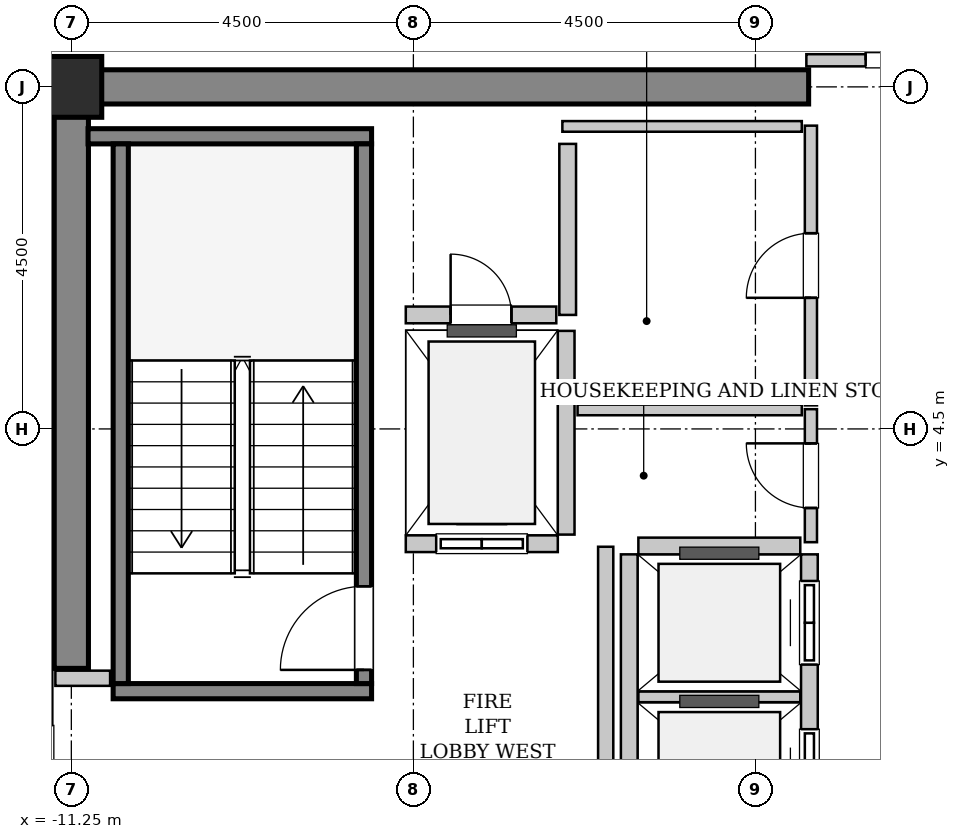
"""IFC4 building model, lengths in metres.
Left out: names, types, materials, properties, quantities, classifications, styles, units other than length and angle.
Written with IfcOpenShell. Run it as: python <this file> out.ifc"""

import sys

from ifc_helpers import new_model, si_unit, direction, frame, frame_2d, origin, origin_2d, place, context, subcontext, project, spatial, rectangle, hollow_rectangle, extrude, source, transform, mapped, element, fill, save


model = new_model("IFC4")
c1 = context("Model", 3, precision=1e-05, world=origin(), true_north=direction((0.0, 1.0)))
c2 = subcontext(c1, "Body", "Model", "MODEL_VIEW")
j1 = project(units=[si_unit("LENGTHUNIT", "METRE"), si_unit("PLANEANGLEUNIT", "RADIAN")], contexts=[c1])
p1 = place(None, origin())
s1 = spatial("IfcSite", under=j1, at=p1, CompositionType="ELEMENT")
p2 = place(p1, origin())
s2 = spatial("IfcBuilding", under=s1, at=p2, CompositionType="ELEMENT")
p3 = place(p2, frame((0.0, 0.0, 283.6)))
s3 = spatial("IfcBuildingStorey", under=s2, at=p3, CompositionType="ELEMENT", Elevation=283.6)
m1 = source(origin(), c2, "Body", "SweptSolid", [
    extrude(rectangle(XDim=9.925, YDim=0.45, at=frame_2d((4.962, 0.0))), origin(), (0.0, 0.0, 1.0), 3.8),
])
p4 = place(p3, frame((-11.475, 9.0, 0.0), z_axis=(0.0, 0.0, 1.0), x_axis=(1.0, 0.0, 0.0)))
e1 = element("IfcWall", 1, at=p4, inside=s3, PredefinedType="SHEAR", context=c2, shape_type="MappedRepresentation", body=[
    mapped(m1, transform((0.0, 0.0, 0.0), x_axis=(1.0, 0.0, 0.0), y_axis=(0.0, 1.0, 0.0), z_axis=(0.0, 0.0, 1.0), scale=1.0)),
])
m2 = source(origin(), c2, "Body", "SweptSolid", [
    extrude(rectangle(XDim=7.425, YDim=0.45, at=frame_2d((3.712, 0.0))), origin(), (0.0, 0.0, 1.0), 3.8),
])
p5 = place(p3, frame((-11.25, 1.35, 0.0), z_axis=(0.0, 0.0, 1.0), x_axis=(0.0, 1.0, 0.0)))
e2 = element("IfcWall", 2, at=p5, inside=s3, PredefinedType="SHEAR", context=c2, shape_type="MappedRepresentation", body=[
    mapped(m2, transform((0.0, 0.0, 0.0), x_axis=(1.0, 0.0, 0.0), y_axis=(0.0, 1.0, 0.0), z_axis=(0.0, 0.0, 1.0), scale=1.0)),
])
m3 = source(origin(), c2, "Body", "SweptSolid", [
    extrude(hollow_rectangle(XDim=0.8, YDim=0.8, WallThickness=0.04, InnerFilletRadius=0.04, OuterFilletRadius=0.08, at=origin_2d()), origin(), (0.0, 0.0, 1.0), 3.8),
])
p6 = place(p3, frame((-11.25, 9.0, 0.0), z_axis=(0.0, 0.0, 1.0), x_axis=(1.0, 0.0, 0.0)))
e3 = element("IfcColumn", 3, at=p6, inside=s3, PredefinedType="COLUMN", context=c2, shape_type="MappedRepresentation", body=[
    mapped(m3, transform((0.0, 0.0, 0.0), x_axis=(1.0, 0.0, 0.0), y_axis=(0.0, 1.0, 0.0), z_axis=(0.0, 0.0, 1.0), scale=1.0)),
])
m4 = source(origin(), c2, "Body", "SweptSolid", [
    extrude(rectangle(XDim=3.4, YDim=0.2, at=frame_2d((1.7, 0.0))), origin(), (0.0, 0.0, 1.0), 3.8),
])
p7 = place(p3, frame((-7.3, 1.05, 0.0), z_axis=(0.0, 0.0, 1.0), x_axis=(-1.0, 0.0, 0.0)))
e4 = element("IfcWall", 4, at=p7, inside=s3, PredefinedType="SOLIDWALL", context=c2, shape_type="MappedRepresentation", body=[
    mapped(m4, transform((0.0, 0.0, 0.0), x_axis=(1.0, 0.0, 0.0), y_axis=(0.0, 1.0, 0.0), z_axis=(0.0, 0.0, 1.0), scale=1.0)),
])
m5 = source(origin(), c2, "Body", "SweptSolid", [
    extrude(rectangle(XDim=3.73, YDim=0.2, at=frame_2d((1.865, 0.0))), origin(), (0.0, 0.0, 1.0), 3.8),
])
p8 = place(p3, frame((-7.3, 8.35, 0.0), z_axis=(0.0, 0.0, 1.0), x_axis=(-1.0, 0.0, 0.0)))
e5 = element("IfcWall", 5, at=p8, inside=s3, PredefinedType="SOLIDWALL", context=c2, shape_type="MappedRepresentation", body=[
    mapped(m5, transform((0.0, 0.0, 0.0), x_axis=(1.0, 0.0, 0.0), y_axis=(0.0, 1.0, 0.0), z_axis=(0.0, 0.0, 1.0), scale=1.0)),
])
m6 = source(origin(), c2, "Body", "SweptSolid", [
    extrude(rectangle(XDim=7.1, YDim=0.2, at=frame_2d((3.55, 0.0))), origin(), (0.0, 0.0, 1.0), 3.8),
])
p9 = place(p3, frame((-7.4, 1.15, 0.0), z_axis=(0.0, 0.0, 1.0), x_axis=(0.0, 1.0, 0.0)))
e6 = element("IfcWall", 6, at=p9, inside=s3, PredefinedType="SOLIDWALL", context=c2, shape_type="MappedRepresentation", body=[
    mapped(m6, transform((0.0, 0.0, 0.0), x_axis=(1.0, 0.0, 0.0), y_axis=(0.0, 1.0, 0.0), z_axis=(0.0, 0.0, 1.0), scale=1.0)),
])
p10 = place(p9, frame((0.18, 0.0, 0.0)))
e7 = element("IfcOpeningElement", 7, at=p10, cuts=e6, PredefinedType="OPENING", context=c2, shape_type="SweptSolid", body=[
    extrude(rectangle(XDim=1.1, YDim=2.15, at=frame_2d((0.55, 1.075))), frame((0.0, 0.11, 0.0), z_axis=(0.0, -1.0, 0.0), x_axis=(1.0, 0.0, 0.0)), (0.0, 0.0, 1.0), 0.22),
])
p11 = place(p3, frame((-10.6, 1.15, 0.0), z_axis=(0.0, 0.0, 1.0), x_axis=(0.0, 1.0, 0.0)))
e8 = element("IfcWall", 8, at=p11, inside=s3, PredefinedType="SOLIDWALL", context=c2, shape_type="MappedRepresentation", body=[
    mapped(m6, transform((0.0, 0.0, 0.0), x_axis=(1.0, 0.0, 0.0), y_axis=(0.0, 1.0, 0.0), z_axis=(0.0, 0.0, 1.0), scale=1.0)),
])
m7 = source(origin(), c2, "Body", "SweptSolid", [
    extrude(rectangle(XDim=2.0, YDim=0.22, at=frame_2d((1.0, 0.0))), origin(), (0.0, 0.0, 1.0), 3.535),
])
p12 = place(p3, frame((-6.85, 2.99, 0.0), z_axis=(0.0, 0.0, 1.0), x_axis=(1.0, 0.0, 0.0)))
e9 = element("IfcWall", 9, at=p12, inside=s3, PredefinedType="SOLIDWALL", context=c2, shape_type="MappedRepresentation", body=[
    mapped(m7, transform((0.0, 0.0, 0.0), x_axis=(1.0, 0.0, 0.0), y_axis=(0.0, 1.0, 0.0), z_axis=(0.0, 0.0, 1.0), scale=1.0)),
])
p13 = place(p12, frame((0.4, 0.0, 0.0)))
e10 = element("IfcOpeningElement", 10, at=p13, cuts=e9, PredefinedType="OPENING", context=c2, shape_type="SweptSolid", body=[
    extrude(rectangle(XDim=1.2, YDim=2.2, at=frame_2d((0.6, 1.1))), frame((0.0, 0.12, 0.0), z_axis=(0.0, -1.0, 0.0), x_axis=(1.0, 0.0, 0.0)), (0.0, 0.0, 1.0), 0.24),
])
m8 = source(origin(), c2, "Body", "SweptSolid", [
    extrude(rectangle(XDim=2.68, YDim=0.22, at=frame_2d((1.34, 0.0))), origin(), (0.0, 0.0, 1.0), 3.535),
])
p14 = place(p3, frame((-4.74, 3.11, 0.0), z_axis=(0.0, 0.0, 1.0), x_axis=(0.0, 1.0, 0.0)))
e11 = element("IfcWall", 11, at=p14, inside=s3, PredefinedType="SOLIDWALL", context=c2, shape_type="MappedRepresentation", body=[
    mapped(m8, transform((0.0, 0.0, 0.0), x_axis=(1.0, 0.0, 0.0), y_axis=(0.0, 1.0, 0.0), z_axis=(0.0, 0.0, 1.0), scale=1.0)),
])
m9 = source(origin(), c2, "Body", "SweptSolid", [
    extrude(rectangle(XDim=5.7, YDim=0.22, at=frame_2d((2.85, 0.0))), origin(), (0.0, 0.0, 1.0), 3.535),
])
p15 = place(p3, frame((-1.54, -2.85, 0.0), z_axis=(0.0, 0.0, 1.0), x_axis=(0.0, 1.0, 0.0)))
e12 = element("IfcWall", 12, at=p15, inside=s3, PredefinedType="SOLIDWALL", context=c2, shape_type="MappedRepresentation", body=[
    mapped(m9, transform((0.0, 0.0, 0.0), x_axis=(1.0, 0.0, 0.0), y_axis=(0.0, 1.0, 0.0), z_axis=(0.0, 0.0, 1.0), scale=1.0)),
])
p16 = place(p15, frame((0.35, 0.0, 0.0)))
e13 = element("IfcOpeningElement", 13, at=p16, cuts=e12, PredefinedType="OPENING", context=c2, shape_type="SweptSolid", body=[
    extrude(rectangle(XDim=1.1, YDim=2.2, at=frame_2d((0.55, 1.1))), frame((0.0, 0.12, 0.0), z_axis=(0.0, -1.0, 0.0), x_axis=(1.0, 0.0, 0.0)), (0.0, 0.0, 1.0), 0.24),
])
p17 = place(p15, frame((2.3, 0.0, 0.0)))
e14 = element("IfcOpeningElement", 14, at=p17, cuts=e12, PredefinedType="OPENING", context=c2, shape_type="SweptSolid", body=[
    extrude(rectangle(XDim=1.1, YDim=2.2, at=frame_2d((0.55, 1.1))), frame((0.0, 0.12, 0.0), z_axis=(0.0, -1.0, 0.0), x_axis=(1.0, 0.0, 0.0)), (0.0, 0.0, 1.0), 0.24),
])
p18 = place(p15, frame((4.25, 0.0, 0.0)))
e15 = element("IfcOpeningElement", 15, at=p18, cuts=e12, PredefinedType="OPENING", context=c2, shape_type="SweptSolid", body=[
    extrude(rectangle(XDim=1.1, YDim=2.2, at=frame_2d((0.55, 1.1))), frame((0.0, 0.12, 0.0), z_axis=(0.0, -1.0, 0.0), x_axis=(1.0, 0.0, 0.0)), (0.0, 0.0, 1.0), 0.24),
])
p19 = place(p3, frame((-3.91, 2.85, 0.0), z_axis=(0.0, 0.0, 1.0), x_axis=(0.0, -1.0, 0.0)))
e16 = element("IfcWall", 16, at=p19, inside=s3, PredefinedType="SOLIDWALL", context=c2, shape_type="MappedRepresentation", body=[
    mapped(m9, transform((0.0, 0.0, 0.0), x_axis=(1.0, 0.0, 0.0), y_axis=(0.0, 1.0, 0.0), z_axis=(0.0, 0.0, 1.0), scale=1.0)),
])
m10 = source(origin(), c2, "Body", "SweptSolid", [
    extrude(rectangle(XDim=2.13, YDim=0.14, at=frame_2d((1.065, 0.0))), origin(), (0.0, 0.0, 1.0), 3.535),
])
p20 = place(p3, frame((-3.79, 0.975, 0.0), z_axis=(0.0, 0.0, 1.0), x_axis=(1.0, 0.0, 0.0)))
e17 = element("IfcWall", 17, at=p20, inside=s3, PredefinedType="PARTITIONING", context=c2, shape_type="MappedRepresentation", body=[
    mapped(m10, transform((0.0, 0.0, 0.0), x_axis=(1.0, 0.0, 0.0), y_axis=(0.0, 1.0, 0.0), z_axis=(0.0, 0.0, 1.0), scale=1.0)),
])
m11 = source(origin(), c2, "Body", "SweptSolid", [
    extrude(rectangle(XDim=2.13, YDim=0.22, at=frame_2d((1.065, 0.0))), origin(), (0.0, 0.0, 1.0), 3.535),
])
p21 = place(p3, frame((-1.66, 2.96, 0.0), z_axis=(0.0, 0.0, 1.0), x_axis=(-1.0, 0.0, 0.0)))
e18 = element("IfcWall", 18, at=p21, inside=s3, PredefinedType="SOLIDWALL", context=c2, shape_type="MappedRepresentation", body=[
    mapped(m11, transform((0.0, 0.0, 0.0), x_axis=(1.0, 0.0, 0.0), y_axis=(0.0, 1.0, 0.0), z_axis=(0.0, 0.0, 1.0), scale=1.0)),
])
m12 = source(origin(), c2, "Body", "SweptSolid", [
    extrude(rectangle(XDim=2.25, YDim=0.22, at=frame_2d((1.125, 0.0))), origin(), (0.0, 0.0, 1.0), 3.535),
])
p22 = place(p3, frame((-4.72, 6.0, 0.0), z_axis=(0.0, 0.0, 1.0), x_axis=(0.0, 1.0, 0.0)))
e19 = element("IfcWall", 19, at=p22, inside=s3, PredefinedType="SOLIDWALL", context=c2, shape_type="MappedRepresentation", body=[
    mapped(m12, transform((0.0, 0.0, 0.0), x_axis=(1.0, 0.0, 0.0), y_axis=(0.0, 1.0, 0.0), z_axis=(0.0, 0.0, 1.0), scale=1.0)),
])
m13 = source(origin(), c2, "Body", "SweptSolid", [
    extrude(rectangle(XDim=1.98, YDim=0.22, at=frame_2d((0.99, 0.0))), origin(), (0.0, 0.0, 1.0), 3.535),
])
p23 = place(p3, frame((-6.85, 6.0, 0.0), z_axis=(0.0, 0.0, 1.0), x_axis=(1.0, 0.0, 0.0)))
e20 = element("IfcWall", 20, at=p23, inside=s3, PredefinedType="SOLIDWALL", context=c2, shape_type="MappedRepresentation", body=[
    mapped(m13, transform((0.0, 0.0, 0.0), x_axis=(1.0, 0.0, 0.0), y_axis=(0.0, 1.0, 0.0), z_axis=(0.0, 0.0, 1.0), scale=1.0)),
])
p24 = place(p23, frame((0.59, 0.0, 0.0)))
e21 = element("IfcOpeningElement", 21, at=p24, cuts=e20, PredefinedType="OPENING", context=c2, shape_type="SweptSolid", body=[
    extrude(rectangle(XDim=0.8, YDim=2.0, at=frame_2d((0.4, 1.0))), frame((0.0, 0.12, 0.0), z_axis=(0.0, -1.0, 0.0), x_axis=(1.0, 0.0, 0.0)), (0.0, 0.0, 1.0), 0.24),
])
m14 = source(origin(), c2, "Body", "SweptSolid", [
    extrude(rectangle(XDim=5.9, YDim=0.2, at=frame_2d((2.95, 0.0))), origin(), (0.0, 0.0, 1.0), 3.535),
])
p25 = place(p3, frame((-4.22, -2.95, 0.0), z_axis=(0.0, 0.0, 1.0), x_axis=(0.0, 1.0, 0.0)))
e22 = element("IfcWall", 22, at=p25, inside=s3, PredefinedType="PARTITIONING", context=c2, shape_type="MappedRepresentation", body=[
    mapped(m14, transform((0.0, 0.0, 0.0), x_axis=(1.0, 0.0, 0.0), y_axis=(0.0, 1.0, 0.0), z_axis=(0.0, 0.0, 1.0), scale=1.0)),
])
m15 = source(origin(), c2, "Body", "SweptSolid", [
    extrude(rectangle(XDim=0.72, YDim=0.2, at=frame_2d((0.36, 0.0))), origin(), (0.0, 0.0, 1.0), 3.535),
])
p26 = place(p3, frame((-11.46, 1.22, 0.0), z_axis=(0.0, 0.0, 1.0), x_axis=(1.0, 0.0, 0.0)))
e23 = element("IfcWall", 23, at=p26, inside=s3, PredefinedType="PARTITIONING", context=c2, shape_type="MappedRepresentation", body=[
    mapped(m15, transform((0.0, 0.0, 0.0), x_axis=(1.0, 0.0, 0.0), y_axis=(0.0, 1.0, 0.0), z_axis=(0.0, 0.0, 1.0), scale=1.0)),
])
m16 = source(origin(), c2, "Body", "SweptSolid", [
    extrude(rectangle(XDim=3.16, YDim=0.16, at=frame_2d((1.58, 0.0))), origin(), (0.0, 0.0, 1.0), 2.625),
])
p27 = place(p3, frame((-1.58, 9.35, 0.0), z_axis=(0.0, 0.0, 1.0), x_axis=(1.0, 0.0, 0.0)))
e24 = element("IfcWall", 24, at=p27, inside=s3, PredefinedType="PARTITIONING", context=c2, shape_type="MappedRepresentation", body=[
    mapped(m16, transform((0.0, 0.0, 0.0), x_axis=(1.0, 0.0, 0.0), y_axis=(0.0, 1.0, 0.0), z_axis=(0.0, 0.0, 1.0), scale=1.0)),
])
p28 = place(p27, frame((0.78, 0.0, 0.0)))
e25 = element("IfcOpeningElement", 25, at=p28, cuts=e24, PredefinedType="OPENING", context=c2, shape_type="SweptSolid", body=[
    extrude(rectangle(XDim=1.6, YDim=2.3, at=frame_2d((0.8, 1.15))), frame((0.0, 0.09, 0.0), z_axis=(0.0, -1.0, 0.0), x_axis=(1.0, 0.0, 0.0)), (0.0, 0.0, 1.0), 0.18),
])
m17 = source(origin(), c2, "Body", "SweptSolid", [
    extrude(rectangle(XDim=1.75, YDim=0.16, at=frame_2d((0.875, 0.0))), origin(), (0.0, 0.0, 1.0), 3.535),
])
p29 = place(p3, frame((-1.52, 3.01, 0.0), z_axis=(0.0, 0.0, 1.0), x_axis=(0.0, 1.0, 0.0)))
e26 = element("IfcWall", 26, at=p29, inside=s3, PredefinedType="PARTITIONING", context=c2, shape_type="MappedRepresentation", body=[
    mapped(m17, transform((0.0, 0.0, 0.0), x_axis=(1.0, 0.0, 0.0), y_axis=(0.0, 1.0, 0.0), z_axis=(0.0, 0.0, 1.0), scale=1.0)),
])
p30 = place(p29, frame((0.45, 0.0, 0.0)))
e27 = element("IfcOpeningElement", 27, at=p30, cuts=e26, PredefinedType="OPENING", context=c2, shape_type="SweptSolid", body=[
    extrude(rectangle(XDim=0.85, YDim=2.1, at=frame_2d((0.425, 1.05))), frame((0.0, 0.09, 0.0), z_axis=(0.0, -1.0, 0.0), x_axis=(1.0, 0.0, 0.0)), (0.0, 0.0, 1.0), 0.18),
])
m18 = source(origin(), c2, "Body", "SweptSolid", [
    extrude(rectangle(XDim=2.95, YDim=0.14, at=frame_2d((1.475, 0.0))), origin(), (0.0, 0.0, 1.0), 3.535),
])
p31 = place(p3, frame((-4.59, 4.75, 0.0), z_axis=(0.0, 0.0, 1.0), x_axis=(1.0, 0.0, 0.0)))
e28 = element("IfcWall", 28, at=p31, inside=s3, PredefinedType="PARTITIONING", context=c2, shape_type="MappedRepresentation", body=[
    mapped(m18, transform((0.0, 0.0, 0.0), x_axis=(1.0, 0.0, 0.0), y_axis=(0.0, 1.0, 0.0), z_axis=(0.0, 0.0, 1.0), scale=1.0)),
])
m19 = source(origin(), c2, "Body", "SweptSolid", [
    extrude(rectangle(XDim=3.68, YDim=0.16, at=frame_2d((1.84, 0.0))), origin(), (0.0, 0.0, 1.0), 3.535),
])
p32 = place(p3, frame((-1.52, 4.81, 0.0), z_axis=(0.0, 0.0, 1.0), x_axis=(0.0, 1.0, 0.0)))
e29 = element("IfcWall", 29, at=p32, inside=s3, PredefinedType="PARTITIONING", context=c2, shape_type="MappedRepresentation", body=[
    mapped(m19, transform((0.0, 0.0, 0.0), x_axis=(1.0, 0.0, 0.0), y_axis=(0.0, 1.0, 0.0), z_axis=(0.0, 0.0, 1.0), scale=1.0)),
])
p33 = place(p32, frame((1.415, 0.0, 0.0)))
e30 = element("IfcOpeningElement", 30, at=p33, cuts=e29, PredefinedType="OPENING", context=c2, shape_type="SweptSolid", body=[
    extrude(rectangle(XDim=0.85, YDim=2.1, at=frame_2d((0.425, 1.05))), frame((0.0, 0.09, 0.0), z_axis=(0.0, -1.0, 0.0), x_axis=(1.0, 0.0, 0.0)), (0.0, 0.0, 1.0), 0.18),
])
m20 = source(origin(), c2, "Body", "SweptSolid", [
    extrude(rectangle(XDim=3.15, YDim=0.14, at=frame_2d((1.575, 0.0))), origin(), (0.0, 0.0, 1.0), 3.535),
])
p34 = place(p3, frame((-4.79, 8.48, 0.0), z_axis=(0.0, 0.0, 1.0), x_axis=(1.0, 0.0, 0.0)))
e31 = element("IfcWall", 31, at=p34, inside=s3, PredefinedType="PARTITIONING", context=c2, shape_type="MappedRepresentation", body=[
    mapped(m20, transform((0.0, 0.0, 0.0), x_axis=(1.0, 0.0, 0.0), y_axis=(0.0, 1.0, 0.0), z_axis=(0.0, 0.0, 1.0), scale=1.0)),
])
m21 = source(origin(), c2, "Body", "SweptSolid", [
    extrude(rectangle(XDim=1.1, YDim=2.15, at=frame_2d((0.55, 1.075))), frame((0.0, 0.025, 0.0), z_axis=(0.0, -1.0, 0.0), x_axis=(1.0, 0.0, 0.0)), (0.0, 0.0, 1.0), 0.05),
])
p35 = place(p10, origin())
e32 = element("IfcDoor", 32, at=p35, inside=s3, OperationType="SINGLE_SWING_LEFT", PredefinedType="DOOR", context=c2, shape_type="MappedRepresentation", body=[
    mapped(m21, transform((0.0, 0.0, 0.0), x_axis=(1.0, 0.0, 0.0), y_axis=(0.0, 1.0, 0.0), z_axis=(0.0, 0.0, 1.0), scale=1.0)),
])
fill(e7, e32)
m22 = source(origin(), c2, "Body", "SweptSolid", [
    extrude(rectangle(XDim=1.2, YDim=2.2, at=frame_2d((0.6, 1.1))), frame((0.0, 0.025, 0.0), z_axis=(0.0, -1.0, 0.0), x_axis=(1.0, 0.0, 0.0)), (0.0, 0.0, 1.0), 0.05),
])
p36 = place(p13, origin())
e33 = element("IfcDoor", 33, at=p36, inside=s3, OperationType="SLIDING_TO_LEFT", PredefinedType="DOOR", context=c2, shape_type="MappedRepresentation", body=[
    mapped(m22, transform((0.0, 0.0, 0.0), x_axis=(1.0, 0.0, 0.0), y_axis=(0.0, 1.0, 0.0), z_axis=(0.0, 0.0, 1.0), scale=1.0)),
])
fill(e10, e33)
m23 = source(origin(), c2, "Body", "SweptSolid", [
    extrude(rectangle(XDim=1.1, YDim=2.2, at=frame_2d((0.55, 1.1))), frame((0.0, 0.025, 0.0), z_axis=(0.0, -1.0, 0.0), x_axis=(1.0, 0.0, 0.0)), (0.0, 0.0, 1.0), 0.05),
])
p37 = place(p17, origin())
e34 = element("IfcDoor", 34, at=p37, inside=s3, OperationType="DOUBLE_DOOR_SLIDING", PredefinedType="DOOR", context=c2, shape_type="MappedRepresentation", body=[
    mapped(m23, transform((0.0, 0.0, 0.0), x_axis=(1.0, 0.0, 0.0), y_axis=(0.0, 1.0, 0.0), z_axis=(0.0, 0.0, 1.0), scale=1.0)),
])
fill(e14, e34)
p38 = place(p18, origin())
e35 = element("IfcDoor", 35, at=p38, inside=s3, OperationType="DOUBLE_DOOR_SLIDING", PredefinedType="DOOR", context=c2, shape_type="MappedRepresentation", body=[
    mapped(m23, transform((0.0, 0.0, 0.0), x_axis=(1.0, 0.0, 0.0), y_axis=(0.0, 1.0, 0.0), z_axis=(0.0, 0.0, 1.0), scale=1.0)),
])
fill(e15, e35)
m24 = source(origin(), c2, "Body", "SweptSolid", [
    extrude(rectangle(XDim=0.8, YDim=2.0, at=frame_2d((0.4, 1.0))), frame((0.0, 0.025, 0.0), z_axis=(0.0, -1.0, 0.0), x_axis=(1.0, 0.0, 0.0)), (0.0, 0.0, 1.0), 0.05),
])
p39 = place(p24, origin())
e36 = element("IfcDoor", 36, at=p39, inside=s3, OperationType="SINGLE_SWING_LEFT", PredefinedType="TRAPDOOR", context=c2, shape_type="MappedRepresentation", body=[
    mapped(m24, transform((0.0, 0.0, 0.0), x_axis=(1.0, 0.0, 0.0), y_axis=(0.0, 1.0, 0.0), z_axis=(0.0, 0.0, 1.0), scale=1.0)),
])
fill(e21, e36)
m25 = source(origin(), c2, "Body", "SweptSolid", [
    extrude(rectangle(XDim=1.6, YDim=2.3, at=frame_2d((0.8, 1.15))), frame((0.0, 0.025, 0.0), z_axis=(0.0, -1.0, 0.0), x_axis=(1.0, 0.0, 0.0)), (0.0, 0.0, 1.0), 0.05),
])
p40 = place(p28, origin())
e37 = element("IfcDoor", 37, at=p40, inside=s3, OperationType="DOUBLE_DOOR_SINGLE_SWING", PredefinedType="DOOR", context=c2, shape_type="MappedRepresentation", body=[
    mapped(m25, transform((0.0, 0.0, 0.0), x_axis=(1.0, 0.0, 0.0), y_axis=(0.0, 1.0, 0.0), z_axis=(0.0, 0.0, 1.0), scale=1.0)),
])
fill(e25, e37)
m26 = source(origin(), c2, "Body", "SweptSolid", [
    extrude(rectangle(XDim=0.85, YDim=2.1, at=frame_2d((0.425, 1.05))), frame((0.0, 0.025, 0.0), z_axis=(0.0, -1.0, 0.0), x_axis=(1.0, 0.0, 0.0)), (0.0, 0.0, 1.0), 0.05),
])
p41 = place(p30, origin())
e38 = element("IfcDoor", 38, at=p41, inside=s3, OperationType="SINGLE_SWING_RIGHT", PredefinedType="DOOR", context=c2, shape_type="MappedRepresentation", body=[
    mapped(m26, transform((0.0, 0.0, 0.0), x_axis=(1.0, 0.0, 0.0), y_axis=(0.0, 1.0, 0.0), z_axis=(0.0, 0.0, 1.0), scale=1.0)),
])
fill(e27, e38)
p42 = place(p33, origin())
e39 = element("IfcDoor", 39, at=p42, inside=s3, OperationType="SINGLE_SWING_LEFT", PredefinedType="DOOR", context=c2, shape_type="MappedRepresentation", body=[
    mapped(m26, transform((0.0, 0.0, 0.0), x_axis=(1.0, 0.0, 0.0), y_axis=(0.0, 1.0, 0.0), z_axis=(0.0, 0.0, 1.0), scale=1.0)),
])
fill(e30, e39)
save(model, sys.argv[1])
